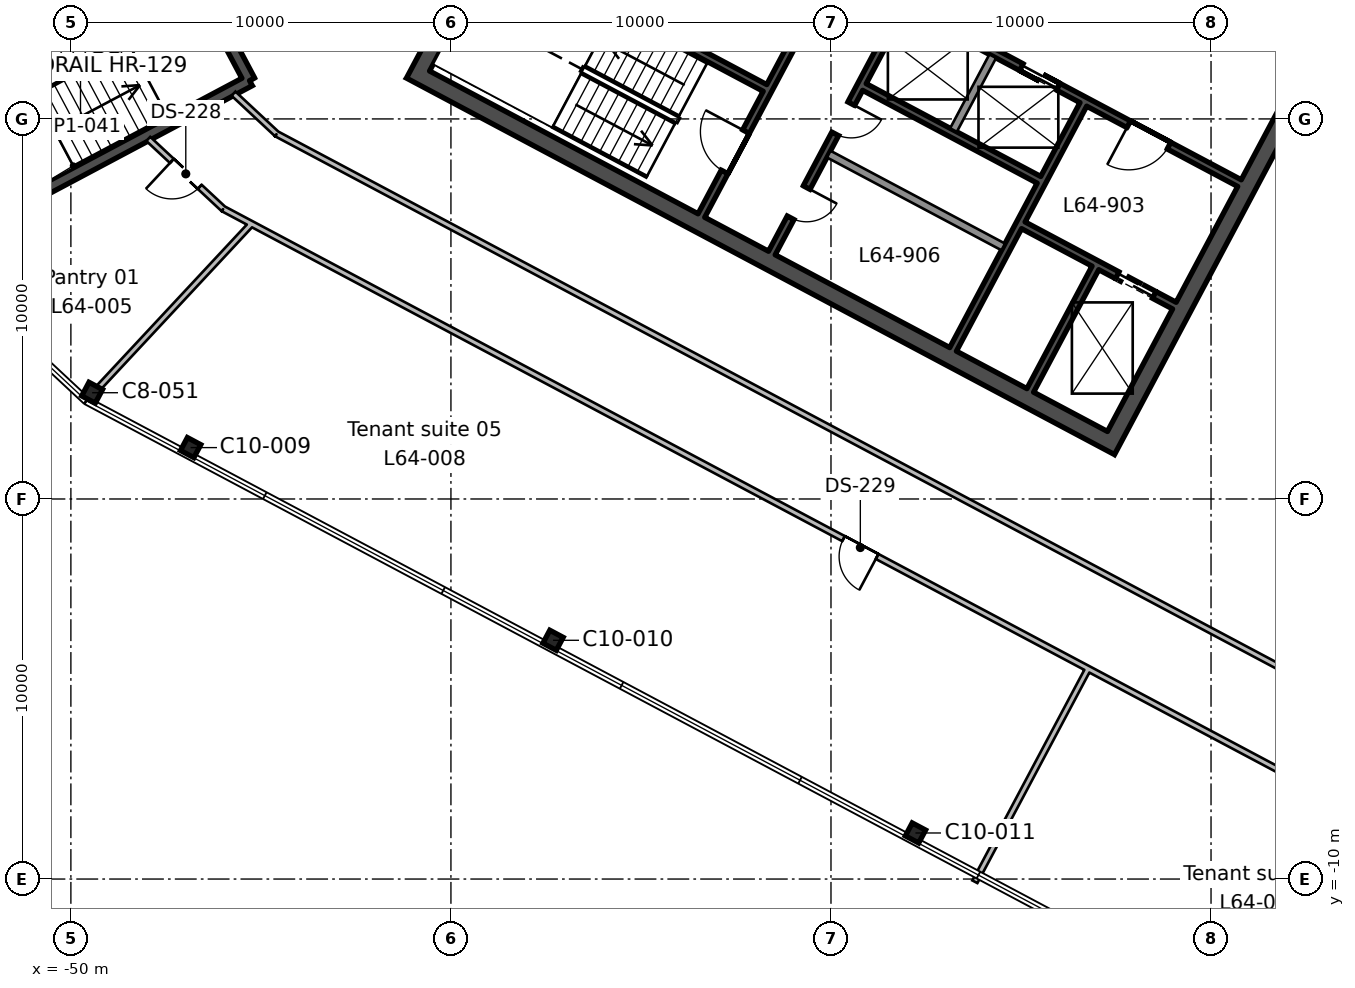
"""IFC4 building model, lengths in metres.
Left out: names, types, materials, properties, quantities, classifications, styles, units other than length and angle.
Written with IfcOpenShell. Run it as: python <this file> out.ifc"""

import sys

from ifc_helpers import new_model, si_unit, direction, frame, frame_2d, origin, origin_2d, place, context, subcontext, project, spatial, rectangle, i_section, extrude, element, fill, save


model = new_model("IFC4")
c1 = context("Model", 3, precision=1e-05, world=origin(), true_north=direction((0.0, 1.0)))
c2 = subcontext(c1, "Body", "Model", "MODEL_VIEW")
j1 = project(units=[si_unit("LENGTHUNIT", "METRE"), si_unit("PLANEANGLEUNIT", "RADIAN")], contexts=[c1])
p1 = place(None, origin())
s1 = spatial("IfcSite", under=j1, at=p1, CompositionType="ELEMENT")
p2 = place(p1, origin())
s2 = spatial("IfcBuilding", under=s1, at=p2, CompositionType="ELEMENT")
p3 = place(p2, frame((0.0, 0.0, 285.3)))
s3 = spatial("IfcBuildingStorey", under=s2, at=p3, CompositionType="ELEMENT", Elevation=285.3)
for number, where, z_axis, x_axis in (
    (1, (-27.777, -8.788, 0.0), (0.0, 0.0, 1.0), (0.883, -0.469, 0.0)),
    (2, (-37.313, -3.718, 0.0), (0.0, 0.0, 1.0), (0.883, -0.469, 0.0)),
    (3, (-46.849, 1.352, 0.0), (0.0, 0.0, 1.0), (0.883, -0.469, 0.0)),
):
    element("IfcColumn", number, at=place(p3, frame(where, z_axis=z_axis, x_axis=x_axis)), inside=s3, PredefinedType="COLUMN", context=c2, shape_type="SweptSolid", body=[
        extrude(i_section(OverallWidth=0.399, OverallDepth=0.386, WebThickness=0.021, FlangeThickness=0.033, FilletRadius=0.015, at=origin_2d()), origin(), (0.0, 0.0, 1.0), 3.9),
    ])
p4 = place(p3, frame((-49.441, 2.796, 0.0), z_axis=(0.0, 0.0, 1.0), x_axis=(0.882947592859, -0.469471562786, 0.0)))
e4 = element("IfcColumn", 4, at=p4, inside=s3, PredefinedType="COLUMN", context=c2, shape_type="SweptSolid", body=[
    extrude(i_section(OverallWidth=0.404, OverallDepth=0.406, WebThickness=0.027, FlangeThickness=0.044, FilletRadius=0.015, at=origin_2d()), origin(), (0.0, 0.0, 1.0), 3.9),
])
p5 = place(p3, frame((-13.771, 18.138, 0.0), z_axis=(0.0, 0.0, 1.0), x_axis=(-0.469467968382, -0.882949504028, 0.0)))
e5 = element("IfcWall", 5, at=p5, inside=s3, PredefinedType="SHEAR", context=c2, shape_type="SweptSolid", body=[
    extrude(rectangle(XDim=19.1, YDim=0.45, at=frame_2d((9.55, 0.0))), origin(), (0.0, 0.0, 1.0), 3.9),
])
p6 = place(p5, frame((6.55, 0.0, 0.0)))
e6 = element("IfcOpeningElement", 6, at=p6, cuts=e5, PredefinedType="OPENING", context=c2, shape_type="SweptSolid", body=[
    extrude(rectangle(XDim=2.4, YDim=2.4, at=frame_2d((1.2, 1.2))), frame((0.0, 0.235, 0.0), z_axis=(0.0, -1.0, 0.0), x_axis=(1.0, 0.0, 0.0)), (0.0, 0.0, 1.0), 0.47),
])
p7 = place(p3, frame((-32.004, 27.833, 0.0), z_axis=(0.0, 0.0, 1.0), x_axis=(-0.469467968382, -0.882949504028, 0.0)))
e7 = element("IfcWall", 7, at=p7, inside=s3, PredefinedType="SHEAR", context=c2, shape_type="SweptSolid", body=[
    extrude(rectangle(XDim=19.1, YDim=0.45, at=frame_2d((9.55, 0.0))), origin(), (0.0, 0.0, 1.0), 3.9),
])
p8 = place(p7, frame((10.15, 0.0, 0.0)))
e8 = element("IfcOpeningElement", 8, at=p8, cuts=e7, PredefinedType="OPENING", context=c2, shape_type="SweptSolid", body=[
    extrude(rectangle(XDim=2.4, YDim=2.4, at=frame_2d((1.2, 1.2))), frame((0.0, 0.235, 0.0), z_axis=(0.0, -1.0, 0.0), x_axis=(1.0, 0.0, 0.0)), (0.0, 0.0, 1.0), 0.47),
])
p9 = place(p3, frame((-22.832, 1.578, 0.0), z_axis=(0.0, 0.0, 1.0), x_axis=(-0.88294509198, 0.469476266226, 0.0)))
e9 = element("IfcWall", 9, at=p9, inside=s3, PredefinedType="SHEAR", context=c2, shape_type="SweptSolid", body=[
    extrude(rectangle(XDim=20.2, YDim=0.45, at=frame_2d((10.1, 0.0))), origin(), (0.0, 0.0, 1.0), 3.9),
])
p10 = place(p3, frame((-23.043, 6.08, 0.0), z_axis=(0.0, 0.0, 1.0), x_axis=(-0.469494272526, -0.882935517501, 0.0)))
e10 = element("IfcWall", 10, at=p10, inside=s3, PredefinedType="SHEAR", context=c2, shape_type="SweptSolid", body=[
    extrude(rectangle(XDim=3.65, YDim=0.2, at=frame_2d((1.825, 0.0))), origin(), (0.0, 0.0, 1.0), 3.9),
])
p11 = place(p3, frame((-23.36, 10.382, 0.0), z_axis=(0.0, 0.0, 1.0), x_axis=(-0.469480409012, -0.88294288918, 0.0)))
e11 = element("IfcWall", 11, at=p11, inside=s3, PredefinedType="SHEAR", context=c2, shape_type="SweptSolid", body=[
    extrude(rectangle(XDim=7.3, YDim=0.2, at=frame_2d((3.65, 0.0))), origin(), (0.0, 0.0, 1.0), 3.9),
])
p12 = place(p3, frame((-25.744, 11.65, 0.0), z_axis=(0.0, 0.0, 1.0), x_axis=(-0.469487830541, -0.882938942948, 0.0)))
e12 = element("IfcWall", 12, at=p12, inside=s3, PredefinedType="SOLIDWALL", context=c2, shape_type="SweptSolid", body=[
    extrude(rectangle(XDim=2.2, YDim=0.2, at=frame_2d((1.1, 0.0))), origin(), (0.0, 0.0, 1.0), 3.9),
])
p13 = place(p3, frame((-28.128, 12.917, 0.0), z_axis=(0.0, 0.0, 1.0), x_axis=(-0.469454336211, -0.882956752176, 0.0)))
e13 = element("IfcWall", 13, at=p13, inside=s3, PredefinedType="SHEAR", context=c2, shape_type="SweptSolid", body=[
    extrude(rectangle(XDim=7.3, YDim=0.2, at=frame_2d((3.65, 0.0))), origin(), (0.0, 0.0, 1.0), 3.9),
])
p14 = place(p13, frame((2.85, 0.0, 0.0)))
e14 = element("IfcOpeningElement", 14, at=p14, cuts=e13, PredefinedType="OPENING", context=c2, shape_type="SweptSolid", body=[
    extrude(rectangle(XDim=0.9, YDim=2.1, at=frame_2d((0.45, 1.05))), frame((0.0, 0.11, 0.0), z_axis=(0.0, -1.0, 0.0), x_axis=(1.0, 0.0, 0.0)), (0.0, 0.0, 1.0), 0.22),
])
p15 = place(p13, frame((5.35, 0.0, 0.0)))
e15 = element("IfcOpeningElement", 15, at=p15, cuts=e13, PredefinedType="OPENING", context=c2, shape_type="SweptSolid", body=[
    extrude(rectangle(XDim=0.9, YDim=2.1, at=frame_2d((0.45, 1.05))), frame((0.0, 0.11, 0.0), z_axis=(0.0, -1.0, 0.0), x_axis=(1.0, 0.0, 0.0)), (0.0, 0.0, 1.0), 0.22),
])
p16 = place(p3, frame((-29.982, 13.903, 0.0), z_axis=(0.0, 0.0, 1.0), x_axis=(-0.469454336211, -0.882956752176, 0.0)))
e16 = element("IfcWall", 16, at=p16, inside=s3, PredefinedType="SHEAR", context=c2, shape_type="SweptSolid", body=[
    extrude(rectangle(XDim=7.3, YDim=0.2, at=frame_2d((3.65, 0.0))), origin(), (0.0, 0.0, 1.0), 3.9),
])
p17 = place(p16, frame((4.8, 0.0, 0.0)))
e17 = element("IfcOpeningElement", 17, at=p17, cuts=e16, PredefinedType="OPENING", context=c2, shape_type="SweptSolid", body=[
    extrude(rectangle(XDim=1.2, YDim=2.1, at=frame_2d((0.6, 1.05))), frame((0.0, 0.11, 0.0), z_axis=(0.0, -1.0, 0.0), x_axis=(1.0, 0.0, 0.0)), (0.0, 0.0, 1.0), 0.22),
])
p18 = place(p3, frame((-19.252, 8.311, 0.0), z_axis=(0.0, 0.0, 1.0), x_axis=(-0.882955722218, 0.469456273365, 0.0)))
e18 = element("IfcWall", 18, at=p18, inside=s3, PredefinedType="SHEAR", context=c2, shape_type="SweptSolid", body=[
    extrude(rectangle(XDim=10.0, YDim=0.2, at=frame_2d((5.0, 0.0))), origin(), (0.0, 0.0, 1.0), 3.9),
])
p19 = place(p18, frame((2.1, 0.0, 0.0)))
e19 = element("IfcOpeningElement", 19, at=p19, cuts=e18, PredefinedType="OPENING", context=c2, shape_type="SweptSolid", body=[
    extrude(rectangle(XDim=1.2, YDim=2.1, at=frame_2d((0.6, 1.05))), frame((0.0, 0.11, 0.0), z_axis=(0.0, -1.0, 0.0), x_axis=(1.0, 0.0, 0.0)), (0.0, 0.0, 1.0), 0.22),
])
p20 = place(p18, frame((5.4, 0.0, 0.0)))
e20 = element("IfcOpeningElement", 20, at=p20, cuts=e18, PredefinedType="OPENING", context=c2, shape_type="SweptSolid", body=[
    extrude(rectangle(XDim=1.1, YDim=2.1, at=frame_2d((0.55, 1.05))), frame((0.0, 0.11, 0.0), z_axis=(0.0, -1.0, 0.0), x_axis=(1.0, 0.0, 0.0)), (0.0, 0.0, 1.0), 0.22),
])
p21 = place(p18, frame((8.1, 0.0, 0.0)))
e21 = element("IfcOpeningElement", 21, at=p21, cuts=e18, PredefinedType="OPENING", context=c2, shape_type="SweptSolid", body=[
    extrude(rectangle(XDim=1.1, YDim=2.1, at=frame_2d((0.55, 1.05))), frame((0.0, 0.11, 0.0), z_axis=(0.0, -1.0, 0.0), x_axis=(1.0, 0.0, 0.0)), (0.0, 0.0, 1.0), 0.22),
])
p22 = place(p3, frame((-24.528, 8.398, 0.0), z_axis=(0.0, 0.0, 1.0), x_axis=(-0.882953967957, 0.469459572775, 0.0)))
e22 = element("IfcWall", 22, at=p22, inside=s3, PredefinedType="SHEAR", context=c2, shape_type="SweptSolid", body=[
    extrude(rectangle(XDim=5.2, YDim=0.2, at=frame_2d((2.6, 0.0))), origin(), (0.0, 0.0, 1.0), 3.9),
])
p23 = place(p3, frame((-20.965, 5.088, 0.0), z_axis=(0.0, 0.0, 1.0), x_axis=(-0.882925986334, 0.469512196493, 0.0)))
e23 = element("IfcWall", 23, at=p23, inside=s3, PredefinedType="SHEAR", context=c2, shape_type="SweptSolid", body=[
    extrude(rectangle(XDim=4.5, YDim=0.2, at=frame_2d((2.25, 0.0))), origin(), (0.0, 0.0, 1.0), 3.9),
])
p24 = place(p23, frame((0.6, 0.0, 0.0)))
e24 = element("IfcOpeningElement", 24, at=p24, cuts=e23, PredefinedType="OPENING", context=c2, shape_type="SweptSolid", body=[
    extrude(rectangle(XDim=1.1, YDim=2.1, at=frame_2d((0.55, 1.05))), frame((0.0, 0.11, 0.0), z_axis=(0.0, -1.0, 0.0), x_axis=(1.0, 0.0, 0.0)), (0.0, 0.0, 1.0), 0.22),
])
p25 = place(p3, frame((-31.737, 10.816, 0.0), z_axis=(0.0, 0.0, 1.0), x_axis=(-0.882940221191, 0.469485426614, 0.0)))
e25 = element("IfcWall", 25, at=p25, inside=s3, PredefinedType="SHEAR", context=c2, shape_type="SweptSolid", body=[
    extrude(rectangle(XDim=8.0, YDim=0.2, at=frame_2d((4.0, 0.0))), origin(), (0.0, 0.0, 1.0), 3.9),
])
p26 = place(p3, frame((-25.467, 6.633, 0.0), z_axis=(0.0, 0.0, 1.0), x_axis=(-0.882953967957, 0.469459572775, 0.0)))
e26 = element("IfcWall", 26, at=p26, inside=s3, PredefinedType="SOLIDWALL", context=c2, shape_type="SweptSolid", body=[
    extrude(rectangle(XDim=5.2, YDim=0.2, at=frame_2d((2.6, 0.0))), origin(), (0.0, 0.0, 1.0), 3.9),
])
p27 = place(p3, frame((-47.574, 15.29, 0.0), z_axis=(0.0, 0.0, 1.0), x_axis=(0.469443498566, -0.882962514297, 0.0)))
e27 = element("IfcWall", 27, at=p27, inside=s3, PredefinedType="SHEAR", context=c2, shape_type="SweptSolid", body=[
    extrude(rectangle(XDim=4.85, YDim=0.3, at=frame_2d((2.425, 0.0))), origin(), (0.0, 0.0, 1.0), 3.9),
])
p28 = place(p3, frame((-45.297, 11.007, 0.0), z_axis=(0.0, 0.0, 1.0), x_axis=(-0.882951519127, -0.469464178475, 0.0)))
e28 = element("IfcWall", 28, at=p28, inside=s3, PredefinedType="SHEAR", context=c2, shape_type="SweptSolid", body=[
    extrude(rectangle(XDim=8.3, YDim=0.3, at=frame_2d((4.15, 0.0))), origin(), (0.0, 0.0, 1.0), 3.9),
])
p29 = place(p3, frame((-54.903, 11.393, 0.0), z_axis=(0.0, 0.0, 1.0), x_axis=(0.882939326045, 0.469487110071, 0.0)))
e29 = element("IfcWall", 29, at=p29, inside=s3, PredefinedType="SHEAR", context=c2, shape_type="SweptSolid", body=[
    extrude(rectangle(XDim=8.3, YDim=0.3, at=frame_2d((4.15, 0.0))), origin(), (0.0, 0.0, 1.0), 3.9),
])
p30 = place(p29, frame((6.05, 0.0, 0.0)))
e30 = element("IfcOpeningElement", 30, at=p30, cuts=e29, PredefinedType="OPENING", context=c2, shape_type="SweptSolid", body=[
    extrude(rectangle(XDim=1.9, YDim=2.1, at=frame_2d((0.95, 1.05))), frame((0.0, 0.16, 0.0), z_axis=(0.0, -1.0, 0.0), x_axis=(1.0, 0.0, 0.0)), (0.0, 0.0, 1.0), 0.32),
])
p31 = place(p3, frame((-45.249, 7.241, 0.0), z_axis=(0.0, 0.0, 1.0), x_axis=(-0.681993289905, -0.731358429584, 0.0)))
e31 = element("IfcWall", 31, at=p31, inside=s3, PredefinedType="PARTITIONING", context=c2, shape_type="SweptSolid", body=[
    extrude(rectangle(XDim=5.89, YDim=0.15, at=frame_2d((2.945, 0.0))), origin(), (0.0, 0.0, 1.0), 3.54),
])
p32 = place(p3, frame((-23.233, -4.466, 0.0), z_axis=(0.0, 0.0, 1.0), x_axis=(-0.469528158273, -0.882917498178, 0.0)))
e32 = element("IfcWall", 32, at=p32, inside=s3, PredefinedType="PARTITIONING", context=c2, shape_type="SweptSolid", body=[
    extrude(rectangle(XDim=6.349, YDim=0.15, at=frame_2d((3.175, 0.0))), origin(), (0.0, 0.0, 1.0), 3.54),
])
p33 = place(p3, frame((-13.8, -6.763, 0.0), z_axis=(0.0, 0.0, 1.0), x_axis=(-0.882949839356, 0.469467337716, 0.0)))
e33 = element("IfcWall", 33, at=p33, inside=s3, PredefinedType="PARTITIONING", context=c2, shape_type="SweptSolid", body=[
    extrude(rectangle(XDim=34.865, YDim=0.15, at=frame_2d((17.433, 0.0))), origin(), (0.0, 0.0, 1.0), 3.54),
])
p34 = place(p3, frame((-44.584, 9.605, 0.0), z_axis=(0.0, 0.0, 1.0), x_axis=(-0.731410317478, 0.681937641934, 0.0)))
e34 = element("IfcWall", 34, at=p34, inside=s3, PredefinedType="PARTITIONING", context=c2, shape_type="SweptSolid", body=[
    extrude(rectangle(XDim=1.554, YDim=0.15, at=frame_2d((0.777, 0.0))), origin(), (0.0, 0.0, 1.0), 3.54),
])
p35 = place(p3, frame((-45.299, 7.267, 0.0), z_axis=(0.0, 0.0, 1.0), x_axis=(-0.882897191907, 0.469566340918, 0.0)))
e35 = element("IfcWall", 35, at=p35, inside=s3, PredefinedType="PARTITIONING", context=c2, shape_type="SweptSolid", body=[
    extrude(rectangle(XDim=0.781, YDim=0.15, at=frame_2d((0.391, 0.0))), origin(), (0.0, 0.0, 1.0), 3.54),
])
p36 = place(p3, frame((-45.989, 7.634, 0.0), z_axis=(0.0, 0.0, 1.0), x_axis=(-0.731461293005, 0.681882964178, 0.0)))
e36 = element("IfcWall", 36, at=p36, inside=s3, PredefinedType="PARTITIONING", context=c2, shape_type="SweptSolid", body=[
    extrude(rectangle(XDim=2.698, YDim=0.15, at=frame_2d((1.349, 0.0))), origin(), (0.0, 0.0, 1.0), 3.54),
])
p37 = place(p36, frame((0.85, 0.0, 0.0)))
e37 = element("IfcOpeningElement", 37, at=p37, cuts=e36, PredefinedType="OPENING", context=c2, shape_type="SweptSolid", body=[
    extrude(rectangle(XDim=1.0, YDim=2.1, at=frame_2d((0.5, 1.05))), frame((0.0, 0.085, 0.0), z_axis=(0.0, -1.0, 0.0), x_axis=(1.0, 0.0, 0.0)), (0.0, 0.0, 1.0), 0.17),
])
p38 = place(p3, frame((-13.114, -9.846, 0.0), z_axis=(0.0, 0.0, 1.0), x_axis=(-0.88294829908, 0.469470234575, 0.0)))
e38 = element("IfcWall", 38, at=p38, inside=s3, PredefinedType="PARTITIONING", context=c2, shape_type="SweptSolid", body=[
    extrude(rectangle(XDim=36.452, YDim=0.15, at=frame_2d((18.226, 0.0))), origin(), (0.0, 0.0, 1.0), 3.54),
])
p39 = place(p38, frame((17.75, 0.0, 0.0)))
e39 = element("IfcOpeningElement", 39, at=p39, cuts=e38, PredefinedType="OPENING", context=c2, shape_type="SweptSolid", body=[
    extrude(rectangle(XDim=1.0, YDim=2.1, at=frame_2d((0.5, 1.05))), frame((0.0, 0.085, 0.0), z_axis=(0.0, -1.0, 0.0), x_axis=(1.0, 0.0, 0.0)), (0.0, 0.0, 1.0), 0.17),
])
p40 = place(p19, origin())
e40 = element("IfcDoor", 40, at=p40, inside=s3, OperationType="SINGLE_SWING_RIGHT", PredefinedType="DOOR", context=c2, shape_type="SweptSolid", body=[
    extrude(rectangle(XDim=1.2, YDim=2.1, at=frame_2d((0.6, 1.05))), frame((0.0, 0.025, 0.0), z_axis=(0.0, -1.0, 0.0), x_axis=(1.0, 0.0, 0.0)), (0.0, 0.0, 1.0), 0.05),
])
fill(e19, e40)
p41 = place(p17, frame((1.2, 0.0, 0.0), z_axis=(0.0, 0.0, 1.0), x_axis=(-1.0, 0.0, 0.0)))
e41 = element("IfcDoor", 41, at=p41, inside=s3, OperationType="SINGLE_SWING_RIGHT", PredefinedType="DOOR", context=c2, shape_type="SweptSolid", body=[
    extrude(rectangle(XDim=1.2, YDim=2.1, at=frame_2d((0.6, 1.05))), frame((0.0, 0.025, 0.0), z_axis=(0.0, -1.0, 0.0), x_axis=(1.0, 0.0, 0.0)), (0.0, 0.0, 1.0), 0.05),
])
fill(e17, e41)
p42 = place(p20, origin())
e42 = element("IfcDoor", 42, at=p42, inside=s3, OperationType="DOUBLE_DOOR_SLIDING", PredefinedType="DOOR", context=c2, shape_type="SweptSolid", body=[
    extrude(rectangle(XDim=1.1, YDim=2.1, at=frame_2d((0.55, 1.05))), frame((0.0, 0.025, 0.0), z_axis=(0.0, -1.0, 0.0), x_axis=(1.0, 0.0, 0.0)), (0.0, 0.0, 1.0), 0.05),
])
fill(e20, e42)
p43 = place(p24, origin())
e43 = element("IfcDoor", 43, at=p43, inside=s3, OperationType="DOUBLE_DOOR_SLIDING", PredefinedType="DOOR", context=c2, shape_type="SweptSolid", body=[
    extrude(rectangle(XDim=1.1, YDim=2.1, at=frame_2d((0.55, 1.05))), frame((0.0, 0.025, 0.0), z_axis=(0.0, -1.0, 0.0), x_axis=(1.0, 0.0, 0.0)), (0.0, 0.0, 1.0), 0.05),
])
fill(e24, e43)
p44 = place(p14, origin())
e44 = element("IfcDoor", 44, at=p44, inside=s3, OperationType="SINGLE_SWING_LEFT", PredefinedType="DOOR", context=c2, shape_type="SweptSolid", body=[
    extrude(rectangle(XDim=0.9, YDim=2.1, at=frame_2d((0.45, 1.05))), frame((0.0, 0.025, 0.0), z_axis=(0.0, -1.0, 0.0), x_axis=(1.0, 0.0, 0.0)), (0.0, 0.0, 1.0), 0.05),
])
fill(e14, e44)
p45 = place(p15, origin())
e45 = element("IfcDoor", 45, at=p45, inside=s3, OperationType="SINGLE_SWING_LEFT", PredefinedType="DOOR", context=c2, shape_type="SweptSolid", body=[
    extrude(rectangle(XDim=0.9, YDim=2.1, at=frame_2d((0.45, 1.05))), frame((0.0, 0.025, 0.0), z_axis=(0.0, -1.0, 0.0), x_axis=(1.0, 0.0, 0.0)), (0.0, 0.0, 1.0), 0.05),
])
fill(e15, e45)
p46 = place(p37, origin())
e46 = element("IfcDoor", 46, at=p46, inside=s3, OperationType="SINGLE_SWING_RIGHT", PredefinedType="DOOR", context=c2, shape_type="SweptSolid", body=[
    extrude(rectangle(XDim=1.0, YDim=2.1, at=frame_2d((0.5, 1.05))), frame((0.0, 0.025, 0.0), z_axis=(0.0, -1.0, 0.0), x_axis=(1.0, 0.0, 0.0)), (0.0, 0.0, 1.0), 0.05),
])
fill(e37, e46)
p47 = place(p39, origin())
e47 = element("IfcDoor", 47, at=p47, inside=s3, OperationType="SINGLE_SWING_LEFT", PredefinedType="DOOR", context=c2, shape_type="SweptSolid", body=[
    extrude(rectangle(XDim=1.0, YDim=2.1, at=frame_2d((0.5, 1.05))), frame((0.0, 0.025, 0.0), z_axis=(0.0, -1.0, 0.0), x_axis=(1.0, 0.0, 0.0)), (0.0, 0.0, 1.0), 0.05),
])
fill(e39, e47)
save(model, sys.argv[1])
